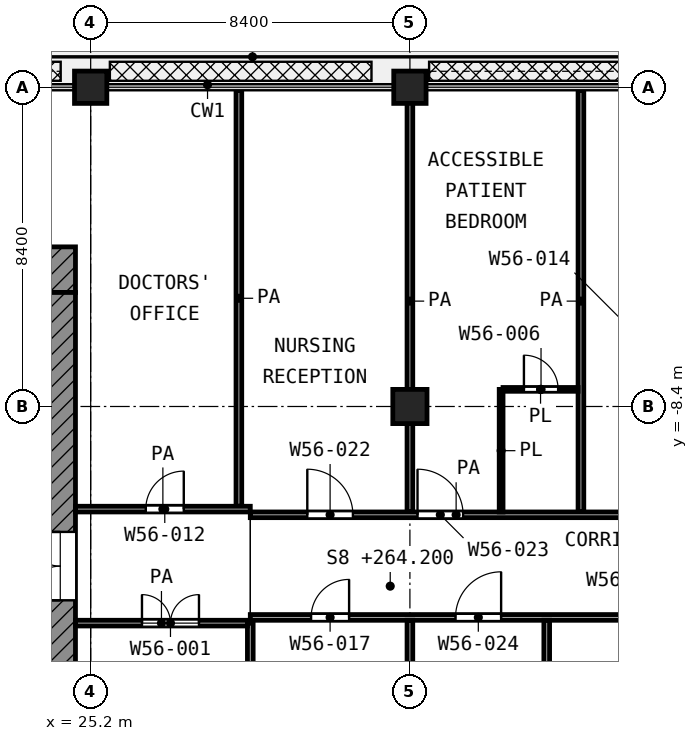
"""IFC4 building model, lengths in metres.
Left out: names, types, materials, properties, quantities, classifications, styles, units other than length and angle.
Written with IfcOpenShell. Run it as: python <this file> out.ifc"""

import sys

from ifc_helpers import new_model, si_unit, direction, frame, frame_2d, origin, origin_2d, place, context, subcontext, project, spatial, rectangle, extrude, element, fill, save


model = new_model("IFC4")
c1 = context("Model", 3, precision=1e-05, world=origin(), true_north=direction((0.0, 1.0)))
c2 = subcontext(c1, "Body", "Model", "MODEL_VIEW")
j1 = project(units=[si_unit("LENGTHUNIT", "METRE"), si_unit("PLANEANGLEUNIT", "RADIAN")], contexts=[c1])
p1 = place(None, origin())
s1 = spatial("IfcSite", under=j1, at=p1, CompositionType="ELEMENT")
p2 = place(p1, origin())
s2 = spatial("IfcBuilding", under=s1, at=p2, CompositionType="ELEMENT")
p3 = place(p2, frame((0.0, 0.0, 264.2)))
s3 = spatial("IfcBuildingStorey", under=s2, at=p3, CompositionType="ELEMENT", Elevation=264.2)
for number, where, z_axis, x_axis in (
    (1, (25.2, 0.0, 0.0), (0.0, 0.0, 1.0), (1.0, 0.0, 0.0)),
    (2, (33.6, 0.0, 0.0), (0.0, 0.0, 1.0), (1.0, 0.0, 0.0)),
):
    element("IfcColumn", number, at=place(p3, frame(where, z_axis=z_axis, x_axis=x_axis)), inside=s3, PredefinedType="COLUMN", context=c2, shape_type="SweptSolid", body=[
        extrude(rectangle(XDim=0.85, YDim=0.85, at=origin_2d()), origin(), (0.0, 0.0, 1.0), 4.2),
    ])
p4 = place(p3, frame((33.6, -8.4, 0.0), z_axis=(0.0, 0.0, 1.0), x_axis=(1.0, 0.0, 0.0)))
e3 = element("IfcColumn", 3, at=p4, inside=s3, PredefinedType="COLUMN", context=c2, shape_type="SweptSolid", body=[
    extrude(rectangle(XDim=0.9, YDim=0.9, at=origin_2d()), origin(), (0.0, 0.0, 1.0), 4.2),
])
p5 = place(p3, frame((4.2, -4.8, 0.0), z_axis=(0.0, 0.0, 1.0), x_axis=(1.0, 0.0, 0.0)))
e4 = element("IfcWall", 4, at=p5, inside=s3, PredefinedType="SHEAR", context=c2, shape_type="SweptSolid", body=[
    extrude(rectangle(XDim=20.6, YDim=1.2, at=frame_2d((10.3, 0.0))), origin(), (0.0, 0.0, 1.0), 3.6),
])
p6 = place(p5, frame((1.95, 0.0, 0.0)))
e5 = element("IfcOpeningElement", 5, at=p6, cuts=e4, PredefinedType="OPENING", context=c2, shape_type="SweptSolid", body=[
    extrude(rectangle(XDim=1.1, YDim=2.1, at=frame_2d((0.55, 1.05))), frame((0.0, 0.61, 0.0), z_axis=(0.0, -1.0, 0.0), x_axis=(1.0, 0.0, 0.0)), (0.0, 0.0, 1.0), 1.22),
])
p7 = place(p5, frame((17.95, 0.0, 0.0)))
e6 = element("IfcOpeningElement", 6, at=p7, cuts=e4, PredefinedType="OPENING", context=c2, shape_type="SweptSolid", body=[
    extrude(rectangle(XDim=1.1, YDim=2.1, at=frame_2d((0.55, 1.05))), frame((0.0, 0.61, 0.0), z_axis=(0.0, -1.0, 0.0), x_axis=(1.0, 0.0, 0.0)), (0.0, 0.0, 1.0), 1.22),
])
p8 = place(p3, frame((24.4, -24.0, 0.0), z_axis=(0.0, 0.0, 1.0), x_axis=(0.0, 1.0, 0.0)))
e7 = element("IfcWall", 7, at=p8, inside=s3, PredefinedType="SHEAR", context=c2, shape_type="SweptSolid", body=[
    extrude(rectangle(XDim=18.6, YDim=0.8, at=frame_2d((9.3, 0.0))), origin(), (0.0, 0.0, 1.0), 3.6),
])
p9 = place(p8, frame((10.5, 0.0, 0.0)))
e8 = element("IfcOpeningElement", 8, at=p9, cuts=e7, PredefinedType="OPENING", context=c2, shape_type="SweptSolid", body=[
    extrude(rectangle(XDim=1.8, YDim=2.1, at=frame_2d((0.9, 1.05))), frame((0.0, 0.41, 0.0), z_axis=(0.0, -1.0, 0.0), x_axis=(1.0, 0.0, 0.0)), (0.0, 0.0, 1.0), 0.82),
])
p10 = place(p3, frame((36.05, -7.95, 0.0), z_axis=(0.0, 0.0, 1.0), x_axis=(1.0, 0.0, 0.0)))
e9 = element("IfcWall", 9, at=p10, inside=s3, PredefinedType="PARTITIONING", context=c2, shape_type="SweptSolid", body=[
    extrude(rectangle(XDim=1.975, YDim=0.1, at=frame_2d((0.987, 0.0))), origin(), (0.0, 0.0, 1.0), 3.6),
])
p11 = place(p10, frame((0.55, 0.0, 0.0)))
e10 = element("IfcOpeningElement", 10, at=p11, cuts=e9, PredefinedType="OPENING", context=c2, shape_type="SweptSolid", body=[
    extrude(rectangle(XDim=0.9, YDim=2.1, at=frame_2d((0.45, 1.05))), frame((0.0, 0.06, 0.0), z_axis=(0.0, -1.0, 0.0), x_axis=(1.0, 0.0, 0.0)), (0.0, 0.0, 1.0), 0.12),
])
p12 = place(p3, frame((36.0, -11.175, 0.0), z_axis=(0.0, 0.0, 1.0), x_axis=(0.0, 1.0, 0.0)))
e11 = element("IfcWall", 11, at=p12, inside=s3, PredefinedType="PARTITIONING", context=c2, shape_type="SweptSolid", body=[
    extrude(rectangle(XDim=3.225, YDim=0.1, at=frame_2d((1.613, 0.0))), origin(), (0.0, 0.0, 1.0), 3.6),
])
p13 = place(p3, frame((24.8, -14.1, 0.0), z_axis=(0.0, 0.0, 1.0), x_axis=(1.0, 0.0, 0.0)))
e12 = element("IfcWall", 12, at=p13, inside=s3, PredefinedType="PARTITIONING", context=c2, shape_type="SweptSolid", body=[
    extrude(rectangle(XDim=4.525, YDim=0.15, at=frame_2d((2.262, 0.0))), origin(), (0.0, 0.0, 1.0), 3.6),
])
p14 = place(p13, frame((1.75, 0.0, 0.0)))
e13 = element("IfcOpeningElement", 13, at=p14, cuts=e12, PredefinedType="OPENING", context=c2, shape_type="SweptSolid", body=[
    extrude(rectangle(XDim=1.5, YDim=2.1, at=frame_2d((0.75, 1.05))), frame((0.0, 0.085, 0.0), z_axis=(0.0, -1.0, 0.0), x_axis=(1.0, 0.0, 0.0)), (0.0, 0.0, 1.0), 0.17),
])
p15 = place(p3, frame((29.4, -13.95, 0.0), z_axis=(0.0, 0.0, 1.0), x_axis=(1.0, 0.0, 0.0)))
e14 = element("IfcWall", 14, at=p15, inside=s3, PredefinedType="PARTITIONING", context=c2, shape_type="SweptSolid", body=[
    extrude(rectangle(XDim=33.52, YDim=0.15, at=frame_2d((16.76, 0.0))), origin(), (0.0, 0.0, 1.0), 2.7),
])
p16 = place(p15, frame((1.6, 0.0, 0.0)))
e15 = element("IfcOpeningElement", 15, at=p16, cuts=e14, PredefinedType="OPENING", context=c2, shape_type="SweptSolid", body=[
    extrude(rectangle(XDim=1.0, YDim=2.1, at=frame_2d((0.5, 1.05))), frame((0.0, 0.085, 0.0), z_axis=(0.0, -1.0, 0.0), x_axis=(1.0, 0.0, 0.0)), (0.0, 0.0, 1.0), 0.17),
])
p17 = place(p15, frame((5.4, 0.0, 0.0)))
e16 = element("IfcOpeningElement", 16, at=p17, cuts=e14, PredefinedType="OPENING", context=c2, shape_type="SweptSolid", body=[
    extrude(rectangle(XDim=1.2, YDim=2.1, at=frame_2d((0.6, 1.05))), frame((0.0, 0.085, 0.0), z_axis=(0.0, -1.0, 0.0), x_axis=(1.0, 0.0, 0.0)), (0.0, 0.0, 1.0), 0.17),
])
p18 = place(p15, frame((11.1, 0.0, 0.0)))
e17 = element("IfcOpeningElement", 17, at=p18, cuts=e14, PredefinedType="OPENING", context=c2, shape_type="SweptSolid", body=[
    extrude(rectangle(XDim=1.2, YDim=2.1, at=frame_2d((0.6, 1.05))), frame((0.0, 0.085, 0.0), z_axis=(0.0, -1.0, 0.0), x_axis=(1.0, 0.0, 0.0)), (0.0, 0.0, 1.0), 0.17),
])
p19 = place(p15, frame((14.2, 0.0, 0.0)))
e18 = element("IfcOpeningElement", 18, at=p19, cuts=e14, PredefinedType="OPENING", context=c2, shape_type="SweptSolid", body=[
    extrude(rectangle(XDim=1.0, YDim=2.1, at=frame_2d((0.5, 1.05))), frame((0.0, 0.085, 0.0), z_axis=(0.0, -1.0, 0.0), x_axis=(1.0, 0.0, 0.0)), (0.0, 0.0, 1.0), 0.17),
])
p20 = place(p15, frame((19.6, 0.0, 0.0)))
e19 = element("IfcOpeningElement", 19, at=p20, cuts=e14, PredefinedType="OPENING", context=c2, shape_type="SweptSolid", body=[
    extrude(rectangle(XDim=1.2, YDim=2.1, at=frame_2d((0.6, 1.05))), frame((0.0, 0.085, 0.0), z_axis=(0.0, -1.0, 0.0), x_axis=(1.0, 0.0, 0.0)), (0.0, 0.0, 1.0), 0.17),
])
p21 = place(p15, frame((22.2, 0.0, 0.0)))
e20 = element("IfcOpeningElement", 20, at=p21, cuts=e14, PredefinedType="OPENING", context=c2, shape_type="SweptSolid", body=[
    extrude(rectangle(XDim=1.2, YDim=2.1, at=frame_2d((0.6, 1.05))), frame((0.0, 0.085, 0.0), z_axis=(0.0, -1.0, 0.0), x_axis=(1.0, 0.0, 0.0)), (0.0, 0.0, 1.0), 0.17),
])
p22 = place(p15, frame((28.95, 0.0, 0.0)))
e21 = element("IfcOpeningElement", 21, at=p22, cuts=e14, PredefinedType="OPENING", context=c2, shape_type="SweptSolid", body=[
    extrude(rectangle(XDim=1.5, YDim=2.1, at=frame_2d((0.75, 1.05))), frame((0.0, 0.085, 0.0), z_axis=(0.0, -1.0, 0.0), x_axis=(1.0, 0.0, 0.0)), (0.0, 0.0, 1.0), 0.17),
])
p23 = place(p3, frame((29.4, -11.25, 0.0), z_axis=(0.0, 0.0, 1.0), x_axis=(1.0, 0.0, 0.0)))
e22 = element("IfcWall", 22, at=p23, inside=s3, PredefinedType="PARTITIONING", context=c2, shape_type="SweptSolid", body=[
    extrude(rectangle(XDim=10.832, YDim=0.15, at=frame_2d((5.416, 0.0))), origin(), (0.0, 0.0, 1.0), 3.6),
])
p24 = place(p23, frame((1.5, 0.0, 0.0)))
e23 = element("IfcOpeningElement", 23, at=p24, cuts=e22, PredefinedType="OPENING", context=c2, shape_type="SweptSolid", body=[
    extrude(rectangle(XDim=1.2, YDim=2.1, at=frame_2d((0.6, 1.05))), frame((0.0, 0.085, 0.0), z_axis=(0.0, -1.0, 0.0), x_axis=(1.0, 0.0, 0.0)), (0.0, 0.0, 1.0), 0.17),
])
p25 = place(p23, frame((4.4, 0.0, 0.0)))
e24 = element("IfcOpeningElement", 24, at=p25, cuts=e22, PredefinedType="OPENING", context=c2, shape_type="SweptSolid", body=[
    extrude(rectangle(XDim=1.2, YDim=2.1, at=frame_2d((0.6, 1.05))), frame((0.0, 0.085, 0.0), z_axis=(0.0, -1.0, 0.0), x_axis=(1.0, 0.0, 0.0)), (0.0, 0.0, 1.0), 0.17),
])
p26 = place(p3, frame((24.8, -11.1, 0.0), z_axis=(0.0, 0.0, 1.0), x_axis=(1.0, 0.0, 0.0)))
e25 = element("IfcWall", 25, at=p26, inside=s3, PredefinedType="PARTITIONING", context=c2, shape_type="SweptSolid", body=[
    extrude(rectangle(XDim=4.6, YDim=0.15, at=frame_2d((2.3, 0.0))), origin(), (0.0, 0.0, 1.0), 3.6),
])
p27 = place(p26, frame((1.85, 0.0, 0.0)))
e26 = element("IfcOpeningElement", 26, at=p27, cuts=e25, PredefinedType="OPENING", context=c2, shape_type="SweptSolid", body=[
    extrude(rectangle(XDim=1.0, YDim=2.1, at=frame_2d((0.5, 1.05))), frame((0.0, 0.085, 0.0), z_axis=(0.0, -1.0, 0.0), x_axis=(1.0, 0.0, 0.0)), (0.0, 0.0, 1.0), 0.17),
])
p28 = place(p3, frame((29.1, -11.025, 0.0), z_axis=(0.0, 0.0, 1.0), x_axis=(0.0, 1.0, 0.0)))
e27 = element("IfcWall", 27, at=p28, inside=s3, PredefinedType="PARTITIONING", context=c2, shape_type="SweptSolid", body=[
    extrude(rectangle(XDim=10.945, YDim=0.15, at=frame_2d((5.472, 0.0))), origin(), (0.0, 0.0, 1.0), 3.6),
])
p29 = place(p3, frame((29.4, -25.2, 0.0), z_axis=(0.0, 0.0, 1.0), x_axis=(0.0, 1.0, 0.0)))
e28 = element("IfcWall", 28, at=p29, inside=s3, PredefinedType="PARTITIONING", context=c2, shape_type="SweptSolid", body=[
    extrude(rectangle(XDim=11.1, YDim=0.15, at=frame_2d((5.55, 0.0))), origin(), (0.0, 0.0, 1.0), 3.6),
])
p30 = place(p3, frame((33.6, -25.12, 0.0), z_axis=(0.0, 0.0, 1.0), x_axis=(0.0, 1.0, 0.0)))
e29 = element("IfcWall", 29, at=p30, inside=s3, PredefinedType="PARTITIONING", context=c2, shape_type="SweptSolid", body=[
    extrude(rectangle(XDim=11.095, YDim=0.15, at=frame_2d((5.548, 0.0))), origin(), (0.0, 0.0, 1.0), 3.6),
])
p31 = place(p3, frame((33.6, -11.175, 0.0), z_axis=(0.0, 0.0, 1.0), x_axis=(0.0, 1.0, 0.0)))
e30 = element("IfcWall", 30, at=p31, inside=s3, PredefinedType="PARTITIONING", context=c2, shape_type="SweptSolid", body=[
    extrude(rectangle(XDim=11.095, YDim=0.15, at=frame_2d((5.547, 0.0))), origin(), (0.0, 0.0, 1.0), 3.6),
])
p32 = place(p3, frame((37.2, -25.12, 0.0), z_axis=(0.0, 0.0, 1.0), x_axis=(0.0, 1.0, 0.0)))
e31 = element("IfcWall", 31, at=p32, inside=s3, PredefinedType="PARTITIONING", context=c2, shape_type="SweptSolid", body=[
    extrude(rectangle(XDim=11.095, YDim=0.15, at=frame_2d((5.548, 0.0))), origin(), (0.0, 0.0, 1.0), 3.6),
])
p33 = place(p3, frame((38.1, -11.175, 0.0), z_axis=(0.0, 0.0, 1.0), x_axis=(0.0, 1.0, 0.0)))
e32 = element("IfcWall", 32, at=p33, inside=s3, PredefinedType="PARTITIONING", context=c2, shape_type="SweptSolid", body=[
    extrude(rectangle(XDim=11.095, YDim=0.15, at=frame_2d((5.547, 0.0))), origin(), (0.0, 0.0, 1.0), 3.6),
])
p34 = place(p9, origin())
e33 = element("IfcDoor", 33, at=p34, inside=s3, OperationType="DOUBLE_DOOR_SINGLE_SWING", PredefinedType="DOOR", context=c2, shape_type="SweptSolid", body=[
    extrude(rectangle(XDim=1.8, YDim=2.1, at=frame_2d((0.9, 1.05))), frame((0.0, 0.025, 0.0), z_axis=(0.0, -1.0, 0.0), x_axis=(1.0, 0.0, 0.0)), (0.0, 0.0, 1.0), 0.05),
])
fill(e8, e33)
p35 = place(p14, origin())
e34 = element("IfcDoor", 34, at=p35, inside=s3, OperationType="DOUBLE_DOOR_SINGLE_SWING", PredefinedType="DOOR", context=c2, shape_type="SweptSolid", body=[
    extrude(rectangle(XDim=1.5, YDim=2.1, at=frame_2d((0.75, 1.05))), frame((0.0, 0.025, 0.0), z_axis=(0.0, -1.0, 0.0), x_axis=(1.0, 0.0, 0.0)), (0.0, 0.0, 1.0), 0.05),
])
fill(e13, e34)
p36 = place(p27, origin())
e35 = element("IfcDoor", 35, at=p36, inside=s3, OperationType="SINGLE_SWING_RIGHT", PredefinedType="DOOR", context=c2, shape_type="SweptSolid", body=[
    extrude(rectangle(XDim=1.0, YDim=2.1, at=frame_2d((0.5, 1.05))), frame((0.0, 0.025, 0.0), z_axis=(0.0, -1.0, 0.0), x_axis=(1.0, 0.0, 0.0)), (0.0, 0.0, 1.0), 0.05),
])
fill(e26, e35)
p37 = place(p24, origin())
e36 = element("IfcDoor", 36, at=p37, inside=s3, OperationType="SINGLE_SWING_LEFT", PredefinedType="DOOR", context=c2, shape_type="SweptSolid", body=[
    extrude(rectangle(XDim=1.2, YDim=2.1, at=frame_2d((0.6, 1.05))), frame((0.0, 0.025, 0.0), z_axis=(0.0, -1.0, 0.0), x_axis=(1.0, 0.0, 0.0)), (0.0, 0.0, 1.0), 0.05),
])
fill(e23, e36)
p38 = place(p25, origin())
e37 = element("IfcDoor", 37, at=p38, inside=s3, OperationType="SINGLE_SWING_LEFT", PredefinedType="DOOR", context=c2, shape_type="SweptSolid", body=[
    extrude(rectangle(XDim=1.2, YDim=2.1, at=frame_2d((0.6, 1.05))), frame((0.0, 0.025, 0.0), z_axis=(0.0, -1.0, 0.0), x_axis=(1.0, 0.0, 0.0)), (0.0, 0.0, 1.0), 0.05),
])
fill(e24, e37)
p39 = place(p11, origin())
e38 = element("IfcDoor", 38, at=p39, inside=s3, OperationType="SINGLE_SWING_LEFT", PredefinedType="DOOR", context=c2, shape_type="SweptSolid", body=[
    extrude(rectangle(XDim=0.9, YDim=2.1, at=frame_2d((0.45, 1.05))), frame((0.0, 0.025, 0.0), z_axis=(0.0, -1.0, 0.0), x_axis=(1.0, 0.0, 0.0)), (0.0, 0.0, 1.0), 0.05),
])
fill(e10, e38)
p40 = place(p16, origin())
e39 = element("IfcDoor", 39, at=p40, inside=s3, OperationType="SINGLE_SWING_RIGHT", PredefinedType="DOOR", context=c2, shape_type="SweptSolid", body=[
    extrude(rectangle(XDim=1.0, YDim=2.1, at=frame_2d((0.5, 1.05))), frame((0.0, 0.025, 0.0), z_axis=(0.0, -1.0, 0.0), x_axis=(1.0, 0.0, 0.0)), (0.0, 0.0, 1.0), 0.05),
])
fill(e15, e39)
p41 = place(p17, origin())
e40 = element("IfcDoor", 40, at=p41, inside=s3, OperationType="SINGLE_SWING_RIGHT", PredefinedType="DOOR", context=c2, shape_type="SweptSolid", body=[
    extrude(rectangle(XDim=1.2, YDim=2.1, at=frame_2d((0.6, 1.05))), frame((0.0, 0.025, 0.0), z_axis=(0.0, -1.0, 0.0), x_axis=(1.0, 0.0, 0.0)), (0.0, 0.0, 1.0), 0.05),
])
fill(e16, e40)
save(model, sys.argv[1])
